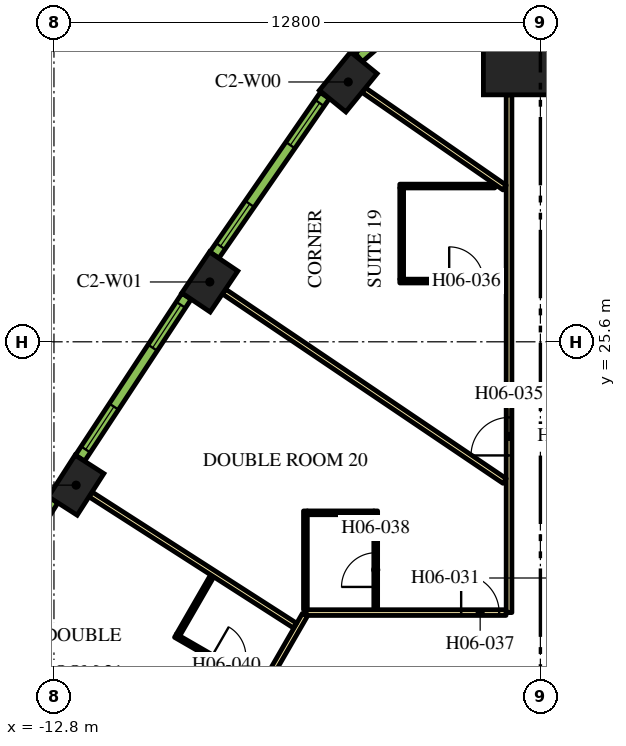
"""IFC4 building model, lengths in metres.
Left out: names, types, materials, properties, quantities, classifications, styles, units other than length and angle.
Written with IfcOpenShell. Run it as: python <this file> out.ifc"""

import sys

from ifc_helpers import new_model, si_unit, direction, frame, frame_2d, origin, origin_2d, place, context, subcontext, project, spatial, rectangle, extrude, element, fill, save


model = new_model("IFC4")
c1 = context("Model", 3, precision=1e-05, world=origin(), true_north=direction((0.0, 1.0)))
c2 = subcontext(c1, "Body", "Model", "MODEL_VIEW")
j1 = project(units=[si_unit("LENGTHUNIT", "METRE"), si_unit("PLANEANGLEUNIT", "RADIAN")], contexts=[c1])
p1 = place(None, origin())
s1 = spatial("IfcSite", under=j1, at=p1, CompositionType="ELEMENT")
p2 = place(p1, origin())
s2 = spatial("IfcBuilding", under=s1, at=p2, CompositionType="ELEMENT")
p3 = place(p2, frame((0.0, 0.0, 91.5)))
s3 = spatial("IfcBuildingStorey", under=s2, at=p3, CompositionType="ELEMENT", Elevation=91.5)
p4 = place(p3, frame((0.0, 33.598, 0.0), z_axis=(0.0, 0.0, 1.0), x_axis=(0.0, 1.0, 0.0)))
e1 = element("IfcColumn", 1, at=p4, inside=s3, PredefinedType="COLUMN", context=c2, shape_type="SweptSolid", body=[
    extrude(rectangle(XDim=3.0, YDim=3.0, at=origin_2d()), origin(), (0.0, 0.0, 1.0), 3.9),
])
for number, where, z_axis, x_axis in (
    (2, (-5.056, 32.437, 0.0), (0.0, 0.0, 1.0), (-0.632, -0.775, 0.0)),
    (3, (-8.699, 27.174, 0.0), (0.0, 0.0, 1.0), (-0.559, -0.829, 0.0)),
    (4, (-12.217, 21.828, 0.0), (0.0, 0.0, 1.0), (-0.54, -0.842, 0.0)),
):
    element("IfcColumn", number, at=place(p3, frame(where, z_axis=z_axis, x_axis=x_axis)), inside=s3, PredefinedType="COLUMN", context=c2, shape_type="SweptSolid", body=[
        extrude(rectangle(XDim=1.3, YDim=0.9, at=origin_2d()), origin(), (0.0, 0.0, 1.0), 3.9),
    ])
p5 = place(p3, frame((-0.825, 18.475, 0.0), z_axis=(0.0, 0.0, 1.0), x_axis=(0.0, 1.0, 0.0)))
e5 = element("IfcWall", 5, at=p5, inside=s3, PredefinedType="PARTITIONING", context=c2, shape_type="SweptSolid", body=[
    extrude(rectangle(XDim=13.623, YDim=0.15, at=frame_2d((6.812, 0.0))), origin(), (0.0, 0.0, 1.0), 2.75),
])
p6 = place(p5, frame((4.135, 0.0, 0.0)))
e6 = element("IfcOpeningElement", 6, at=p6, cuts=e5, PredefinedType="OPENING", context=c2, shape_type="SweptSolid", body=[
    extrude(rectangle(XDim=1.0, YDim=2.1, at=frame_2d((0.5, 1.05))), frame((0.0, 0.085, 0.0), z_axis=(0.0, -1.0, 0.0), x_axis=(1.0, 0.0, 0.0)), (0.0, 0.0, 1.0), 0.17),
])
p7 = place(p3, frame((-6.163, 18.475, 0.0), z_axis=(0.0, 0.0, 1.0), x_axis=(1.0, 0.0, 0.0)))
e7 = element("IfcWall", 7, at=p7, inside=s3, PredefinedType="PARTITIONING", context=c2, shape_type="SweptSolid", body=[
    extrude(rectangle(XDim=5.258, YDim=0.15, at=frame_2d((2.629, 0.0))), origin(), (0.0, 0.0, 1.0), 2.75),
])
p8 = place(p7, frame((4.078, 0.0, 0.0)))
e8 = element("IfcOpeningElement", 8, at=p8, cuts=e7, PredefinedType="OPENING", context=c2, shape_type="SweptSolid", body=[
    extrude(rectangle(XDim=1.0, YDim=2.1, at=frame_2d((0.5, 1.05))), frame((0.0, 0.085, 0.0), z_axis=(0.0, -1.0, 0.0), x_axis=(1.0, 0.0, 0.0)), (0.0, 0.0, 1.0), 0.17),
])
p9 = place(p3, frame((-19.081, -3.9, 0.0), z_axis=(0.0, 0.0, 1.0), x_axis=(0.499998313975, 0.866026377209, 0.0)))
e9 = element("IfcWall", 9, at=p9, inside=s3, PredefinedType="PARTITIONING", context=c2, shape_type="SweptSolid", body=[
    extrude(rectangle(XDim=25.766, YDim=0.15, at=frame_2d((12.883, 0.0))), origin(), (0.0, 0.0, 1.0), 2.75),
])
p10 = place(p9, frame((19.306, 0.0, 0.0)))
e10 = element("IfcOpeningElement", 10, at=p10, cuts=e9, PredefinedType="OPENING", context=c2, shape_type="SweptSolid", body=[
    extrude(rectangle(XDim=1.0, YDim=2.1, at=frame_2d((0.5, 1.05))), frame((0.0, 0.085, 0.0), z_axis=(0.0, -1.0, 0.0), x_axis=(1.0, 0.0, 0.0)), (0.0, 0.0, 1.0), 0.17),
])
p11 = place(p9, frame((18.0, 0.0, 0.0)))
e11 = element("IfcOpeningElement", 11, at=p11, cuts=e9, PredefinedType="OPENING", context=c2, shape_type="SweptSolid", body=[
    extrude(rectangle(XDim=1.0, YDim=2.1, at=frame_2d((0.5, 1.05))), frame((0.0, 0.085, 0.0), z_axis=(0.0, -1.0, 0.0), x_axis=(1.0, 0.0, 0.0)), (0.0, 0.0, 1.0), 0.17),
])
p12 = place(p9, frame((10.874, 0.0, 0.0)))
e12 = element("IfcOpeningElement", 12, at=p12, cuts=e9, PredefinedType="OPENING", context=c2, shape_type="SweptSolid", body=[
    extrude(rectangle(XDim=0.9, YDim=2.1, at=frame_2d((0.45, 1.05))), frame((0.0, 0.085, 0.0), z_axis=(0.0, -1.0, 0.0), x_axis=(1.0, 0.0, 0.0)), (0.0, 0.0, 1.0), 0.17),
])
p13 = place(p9, frame((8.548, 0.0, 0.0)))
e13 = element("IfcOpeningElement", 13, at=p13, cuts=e9, PredefinedType="OPENING", context=c2, shape_type="SweptSolid", body=[
    extrude(rectangle(XDim=1.1, YDim=2.1, at=frame_2d((0.55, 1.05))), frame((0.0, 0.085, 0.0), z_axis=(0.0, -1.0, 0.0), x_axis=(1.0, 0.0, 0.0)), (0.0, 0.0, 1.0), 0.17),
])
p14 = place(p9, frame((0.18, 0.0, 0.0)))
e14 = element("IfcOpeningElement", 14, at=p14, cuts=e9, PredefinedType="OPENING", context=c2, shape_type="SweptSolid", body=[
    extrude(rectangle(XDim=1.0, YDim=2.1, at=frame_2d((0.5, 1.05))), frame((0.0, 0.085, 0.0), z_axis=(0.0, -1.0, 0.0), x_axis=(1.0, 0.0, 0.0)), (0.0, 0.0, 1.0), 0.17),
])
p15 = place(p3, frame((-11.838, 21.585, 0.0), z_axis=(0.0, 0.0, 1.0), x_axis=(0.841699322813, -0.539946525108, 0.0)))
e15 = element("IfcWall", 15, at=p15, inside=s3, PredefinedType="PARTITIONING", context=c2, shape_type="SweptSolid", body=[
    extrude(rectangle(XDim=6.392, YDim=0.15, at=frame_2d((3.196, 0.0))), origin(), (0.0, 0.0, 1.0), 2.75),
])
p16 = place(p3, frame((-8.326, 26.923, 0.0), z_axis=(0.0, 0.0, 1.0), x_axis=(0.828836601893, -0.5594907393, 0.0)))
e16 = element("IfcWall", 16, at=p16, inside=s3, PredefinedType="PARTITIONING", context=c2, shape_type="SweptSolid", body=[
    extrude(rectangle(XDim=8.909, YDim=0.15, at=frame_2d((4.455, 0.0))), origin(), (0.0, 0.0, 1.0), 2.75),
])
p17 = place(p3, frame((-4.649, 32.223, 0.0), z_axis=(0.0, 0.0, 1.0), x_axis=(0.822262349475, -0.569108626394, 0.0)))
e17 = element("IfcWall", 17, at=p17, inside=s3, PredefinedType="PARTITIONING", context=c2, shape_type="SweptSolid", body=[
    extrude(rectangle(XDim=4.51, YDim=0.15, at=frame_2d((2.255, 0.0))), origin(), (0.0, 0.0, 1.0), 2.75),
])
p18 = place(p3, frame((-3.7, 27.198, 0.0), z_axis=(0.0, 0.0, 1.0), x_axis=(1.0, 0.0, 0.0)))
e18 = element("IfcWall", 18, at=p18, inside=s3, PredefinedType="PARTITIONING", context=c2, shape_type="SweptSolid", body=[
    extrude(rectangle(XDim=2.8, YDim=0.1, at=frame_2d((1.4, 0.0))), origin(), (0.0, 0.0, 1.0), 2.75),
])
p19 = place(p18, frame((1.3, 0.0, 0.0)))
e19 = element("IfcOpeningElement", 19, at=p19, cuts=e18, PredefinedType="OPENING", context=c2, shape_type="SweptSolid", body=[
    extrude(rectangle(XDim=0.9, YDim=2.1, at=frame_2d((0.45, 1.05))), frame((0.0, 0.06, 0.0), z_axis=(0.0, -1.0, 0.0), x_axis=(1.0, 0.0, 0.0)), (0.0, 0.0, 1.0), 0.12),
])
p20 = place(p3, frame((-3.65, 27.248, 0.0), z_axis=(0.0, 0.0, 1.0), x_axis=(0.0, 1.0, 0.0)))
e20 = element("IfcWall", 20, at=p20, inside=s3, PredefinedType="PARTITIONING", context=c2, shape_type="SweptSolid", body=[
    extrude(rectangle(XDim=2.4, YDim=0.1, at=frame_2d((1.2, 0.0))), origin(), (0.0, 0.0, 1.0), 2.75),
])
p21 = place(p3, frame((-1.2, 29.698, 0.0), z_axis=(0.0, 0.0, 1.0), x_axis=(-1.0, 0.0, 0.0)))
e21 = element("IfcWall", 21, at=p21, inside=s3, PredefinedType="PARTITIONING", context=c2, shape_type="SweptSolid", body=[
    extrude(rectangle(XDim=2.5, YDim=0.1, at=frame_2d((1.25, 0.0))), origin(), (0.0, 0.0, 1.0), 2.75),
])
p22 = place(p3, frame((-4.333, 18.55, 0.0), z_axis=(0.0, 0.0, 1.0), x_axis=(0.0, 1.0, 0.0)))
e22 = element("IfcWall", 22, at=p22, inside=s3, PredefinedType="PARTITIONING", context=c2, shape_type="SweptSolid", body=[
    extrude(rectangle(XDim=2.6, YDim=0.1, at=frame_2d((1.3, 0.0))), origin(), (0.0, 0.0, 1.0), 2.75),
])
p23 = place(p22, frame((0.6, 0.0, 0.0)))
e23 = element("IfcOpeningElement", 23, at=p23, cuts=e22, PredefinedType="OPENING", context=c2, shape_type="SweptSolid", body=[
    extrude(rectangle(XDim=0.9, YDim=2.1, at=frame_2d((0.45, 1.05))), frame((0.0, 0.06, 0.0), z_axis=(0.0, -1.0, 0.0), x_axis=(1.0, 0.0, 0.0)), (0.0, 0.0, 1.0), 0.12),
])
p24 = place(p3, frame((-4.383, 21.1, 0.0), z_axis=(0.0, 0.0, 1.0), x_axis=(-1.0, 0.0, 0.0)))
e24 = element("IfcWall", 24, at=p24, inside=s3, PredefinedType="PARTITIONING", context=c2, shape_type="SweptSolid", body=[
    extrude(rectangle(XDim=1.75, YDim=0.1, at=frame_2d((0.875, 0.0))), origin(), (0.0, 0.0, 1.0), 2.75),
])
p25 = place(p3, frame((-6.183, 18.55, 0.0), z_axis=(0.0, 0.0, 1.0), x_axis=(0.0, 1.0, 0.0)))
e25 = element("IfcWall", 25, at=p25, inside=s3, PredefinedType="PARTITIONING", context=c2, shape_type="SweptSolid", body=[
    extrude(rectangle(XDim=2.6, YDim=0.1, at=frame_2d((1.3, 0.0))), origin(), (0.0, 0.0, 1.0), 2.75),
])
p26 = place(p3, frame((-9.603, 17.868, 0.0), z_axis=(0.0, 0.0, 1.0), x_axis=(0.866021400173, -0.500006934395, 0.0)))
e26 = element("IfcWall", 26, at=p26, inside=s3, PredefinedType="PARTITIONING", context=c2, shape_type="SweptSolid", body=[
    extrude(rectangle(XDim=2.6, YDim=0.1, at=frame_2d((1.3, 0.0))), origin(), (0.0, 0.0, 1.0), 2.75),
])
p27 = place(p26, frame((1.1, 0.0, 0.0)))
e27 = element("IfcOpeningElement", 27, at=p27, cuts=e26, PredefinedType="OPENING", context=c2, shape_type="SweptSolid", body=[
    extrude(rectangle(XDim=0.9, YDim=2.1, at=frame_2d((0.45, 1.05))), frame((0.0, 0.06, 0.0), z_axis=(0.0, -1.0, 0.0), x_axis=(1.0, 0.0, 0.0)), (0.0, 0.0, 1.0), 0.12),
])
p28 = place(p3, frame((-9.534, 17.886, 0.0), z_axis=(0.0, 0.0, 1.0), x_axis=(0.500041240653, 0.866001592173, 0.0)))
e28 = element("IfcWall", 28, at=p28, inside=s3, PredefinedType="PARTITIONING", context=c2, shape_type="SweptSolid", body=[
    extrude(rectangle(XDim=1.79, YDim=0.1, at=frame_2d((0.895, 0.0))), origin(), (0.0, 0.0, 1.0), 2.75),
])
p29 = place(p3, frame((-3.405, 34.275, 0.0), z_axis=(0.0, 0.0, 1.0), x_axis=(-0.754882764627, -0.655859749999, 0.0)))
e29 = element("IfcWall", 29, at=p29, inside=s3, PredefinedType="SOLIDWALL", context=c2, shape_type="SweptSolid", body=[
    extrude(rectangle(XDim=1.82, YDim=0.29, at=frame_2d((0.91, 0.0))), origin(), (0.0, 0.0, 1.0), 3.65),
])
p30 = place(p29, frame((0.46, 0.0, 0.9)))
e30 = element("IfcOpeningElement", 30, at=p30, cuts=e29, PredefinedType="OPENING", context=c2, shape_type="SweptSolid", body=[
    extrude(rectangle(XDim=0.9, YDim=2.15, at=frame_2d((0.45, 1.075))), frame((0.0, 0.155, 0.0), z_axis=(0.0, -1.0, 0.0), x_axis=(1.0, 0.0, 0.0)), (0.0, 0.0, 1.0), 0.31),
])
p31 = place(p3, frame((-5.673, 32.081, 0.0), z_axis=(0.0, 0.0, 1.0), x_axis=(-0.569113019126, -0.822259309136, 0.0)))
e31 = element("IfcWall", 31, at=p31, inside=s3, PredefinedType="SOLIDWALL", context=c2, shape_type="SweptSolid", body=[
    extrude(rectangle(XDim=5.107, YDim=0.29, at=frame_2d((2.553, 0.0))), origin(), (0.0, 0.0, 1.0), 3.65),
])
p32 = place(p31, frame((0.24, 0.0, 0.9)))
e32 = element("IfcOpeningElement", 32, at=p32, cuts=e31, PredefinedType="OPENING", context=c2, shape_type="SweptSolid", body=[
    extrude(rectangle(XDim=1.35, YDim=2.15, at=frame_2d((0.675, 1.075))), frame((0.0, 0.155, 0.0), z_axis=(0.0, -1.0, 0.0), x_axis=(1.0, 0.0, 0.0)), (0.0, 0.0, 1.0), 0.31),
])
p33 = place(p31, frame((3.471, 0.0, 0.9)))
e33 = element("IfcOpeningElement", 33, at=p33, cuts=e31, PredefinedType="OPENING", context=c2, shape_type="SweptSolid", body=[
    extrude(rectangle(XDim=1.35, YDim=2.15, at=frame_2d((0.675, 1.075))), frame((0.0, 0.155, 0.0), z_axis=(0.0, -1.0, 0.0), x_axis=(1.0, 0.0, 0.0)), (0.0, 0.0, 1.0), 0.31),
])
p34 = place(p3, frame((-9.311, 26.799, 0.0), z_axis=(0.0, 0.0, 1.0), x_axis=(-0.549741341923, -0.835334937005, 0.0)))
e34 = element("IfcWall", 34, at=p34, inside=s3, PredefinedType="SOLIDWALL", context=c2, shape_type="SweptSolid", body=[
    extrude(rectangle(XDim=5.1, YDim=0.29, at=frame_2d((2.55, 0.0))), origin(), (0.0, 0.0, 1.0), 3.65),
])
p35 = place(p34, frame((0.273, 0.0, 0.9)))
e35 = element("IfcOpeningElement", 35, at=p35, cuts=e34, PredefinedType="OPENING", context=c2, shape_type="SweptSolid", body=[
    extrude(rectangle(XDim=1.35, YDim=2.15, at=frame_2d((0.675, 1.075))), frame((0.0, 0.155, 0.0), z_axis=(0.0, -1.0, 0.0), x_axis=(1.0, 0.0, 0.0)), (0.0, 0.0, 1.0), 0.31),
])
p36 = place(p34, frame((3.478, 0.0, 0.9)))
e36 = element("IfcOpeningElement", 36, at=p36, cuts=e34, PredefinedType="OPENING", context=c2, shape_type="SweptSolid", body=[
    extrude(rectangle(XDim=1.35, YDim=2.15, at=frame_2d((0.675, 1.075))), frame((0.0, 0.155, 0.0), z_axis=(0.0, -1.0, 0.0), x_axis=(1.0, 0.0, 0.0)), (0.0, 0.0, 1.0), 0.31),
])
p37 = place(p3, frame((-12.82, 21.439, 0.0), z_axis=(0.0, 0.0, 1.0), x_axis=(-0.530072082134, -0.847952585787, 0.0)))
e37 = element("IfcWall", 37, at=p37, inside=s3, PredefinedType="SOLIDWALL", context=c2, shape_type="SweptSolid", body=[
    extrude(rectangle(XDim=5.1, YDim=0.29, at=frame_2d((2.55, 0.0))), origin(), (0.0, 0.0, 1.0), 3.65),
])
p38 = place(p37, frame((0.273, 0.0, 0.9)))
e38 = element("IfcOpeningElement", 38, at=p38, cuts=e37, PredefinedType="OPENING", context=c2, shape_type="SweptSolid", body=[
    extrude(rectangle(XDim=1.35, YDim=2.15, at=frame_2d((0.675, 1.075))), frame((0.0, 0.155, 0.0), z_axis=(0.0, -1.0, 0.0), x_axis=(1.0, 0.0, 0.0)), (0.0, 0.0, 1.0), 0.31),
])
p39 = place(p37, frame((3.478, 0.0, 0.9)))
e39 = element("IfcOpeningElement", 39, at=p39, cuts=e37, PredefinedType="OPENING", context=c2, shape_type="SweptSolid", body=[
    extrude(rectangle(XDim=1.35, YDim=2.15, at=frame_2d((0.675, 1.075))), frame((0.0, 0.155, 0.0), z_axis=(0.0, -1.0, 0.0), x_axis=(1.0, 0.0, 0.0)), (0.0, 0.0, 1.0), 0.31),
])
p40 = place(p6, origin())
e40 = element("IfcDoor", 40, at=p40, inside=s3, OperationType="SINGLE_SWING_LEFT", PredefinedType="DOOR", context=c2, shape_type="SweptSolid", body=[
    extrude(rectangle(XDim=1.0, YDim=2.1, at=frame_2d((0.5, 1.05))), frame((0.0, 0.025, 0.0), z_axis=(0.0, -1.0, 0.0), x_axis=(1.0, 0.0, 0.0)), (0.0, 0.0, 1.0), 0.05),
])
fill(e6, e40)
p41 = place(p19, origin())
e41 = element("IfcDoor", 41, at=p41, inside=s3, OperationType="SINGLE_SWING_LEFT", PredefinedType="DOOR", context=c2, shape_type="SweptSolid", body=[
    extrude(rectangle(XDim=0.9, YDim=2.1, at=frame_2d((0.45, 1.05))), frame((0.0, 0.025, 0.0), z_axis=(0.0, -1.0, 0.0), x_axis=(1.0, 0.0, 0.0)), (0.0, 0.0, 1.0), 0.05),
])
fill(e19, e41)
p42 = place(p8, origin())
e42 = element("IfcDoor", 42, at=p42, inside=s3, OperationType="SINGLE_SWING_RIGHT", PredefinedType="DOOR", context=c2, shape_type="SweptSolid", body=[
    extrude(rectangle(XDim=1.0, YDim=2.1, at=frame_2d((0.5, 1.05))), frame((0.0, 0.025, 0.0), z_axis=(0.0, -1.0, 0.0), x_axis=(1.0, 0.0, 0.0)), (0.0, 0.0, 1.0), 0.05),
])
fill(e8, e42)
p43 = place(p23, origin())
e43 = element("IfcDoor", 43, at=p43, inside=s3, OperationType="SINGLE_SWING_LEFT", PredefinedType="DOOR", context=c2, shape_type="SweptSolid", body=[
    extrude(rectangle(XDim=0.9, YDim=2.1, at=frame_2d((0.45, 1.05))), frame((0.0, 0.025, 0.0), z_axis=(0.0, -1.0, 0.0), x_axis=(1.0, 0.0, 0.0)), (0.0, 0.0, 1.0), 0.05),
])
fill(e23, e43)
p44 = place(p27, origin())
e44 = element("IfcDoor", 44, at=p44, inside=s3, OperationType="SINGLE_SWING_RIGHT", PredefinedType="DOOR", context=c2, shape_type="SweptSolid", body=[
    extrude(rectangle(XDim=0.9, YDim=2.1, at=frame_2d((0.45, 1.05))), frame((0.0, 0.025, 0.0), z_axis=(0.0, -1.0, 0.0), x_axis=(1.0, 0.0, 0.0)), (0.0, 0.0, 1.0), 0.05),
])
fill(e27, e44)
p45 = place(p32, origin())
e45 = element("IfcWindow", 45, at=p45, inside=s3, PartitioningType="DOUBLE_PANEL_VERTICAL", PredefinedType="WINDOW", context=c2, shape_type="SweptSolid", body=[
    extrude(rectangle(XDim=1.35, YDim=2.15, at=frame_2d((0.675, 1.075))), frame((0.0, 0.015, 0.0), z_axis=(0.0, -1.0, 0.0), x_axis=(1.0, 0.0, 0.0)), (0.0, 0.0, 1.0), 0.06),
])
fill(e32, e45)
p46 = place(p33, origin())
e46 = element("IfcWindow", 46, at=p46, inside=s3, PartitioningType="DOUBLE_PANEL_VERTICAL", PredefinedType="WINDOW", context=c2, shape_type="SweptSolid", body=[
    extrude(rectangle(XDim=1.35, YDim=2.15, at=frame_2d((0.675, 1.075))), frame((0.0, 0.015, 0.0), z_axis=(0.0, -1.0, 0.0), x_axis=(1.0, 0.0, 0.0)), (0.0, 0.0, 1.0), 0.06),
])
fill(e33, e46)
p47 = place(p35, origin())
e47 = element("IfcWindow", 47, at=p47, inside=s3, PartitioningType="DOUBLE_PANEL_VERTICAL", PredefinedType="WINDOW", context=c2, shape_type="SweptSolid", body=[
    extrude(rectangle(XDim=1.35, YDim=2.15, at=frame_2d((0.675, 1.075))), frame((0.0, 0.015, 0.0), z_axis=(0.0, -1.0, 0.0), x_axis=(1.0, 0.0, 0.0)), (0.0, 0.0, 1.0), 0.06),
])
fill(e35, e47)
p48 = place(p36, origin())
e48 = element("IfcWindow", 48, at=p48, inside=s3, PartitioningType="DOUBLE_PANEL_VERTICAL", PredefinedType="WINDOW", context=c2, shape_type="SweptSolid", body=[
    extrude(rectangle(XDim=1.35, YDim=2.15, at=frame_2d((0.675, 1.075))), frame((0.0, 0.015, 0.0), z_axis=(0.0, -1.0, 0.0), x_axis=(1.0, 0.0, 0.0)), (0.0, 0.0, 1.0), 0.06),
])
fill(e36, e48)
save(model, sys.argv[1])
